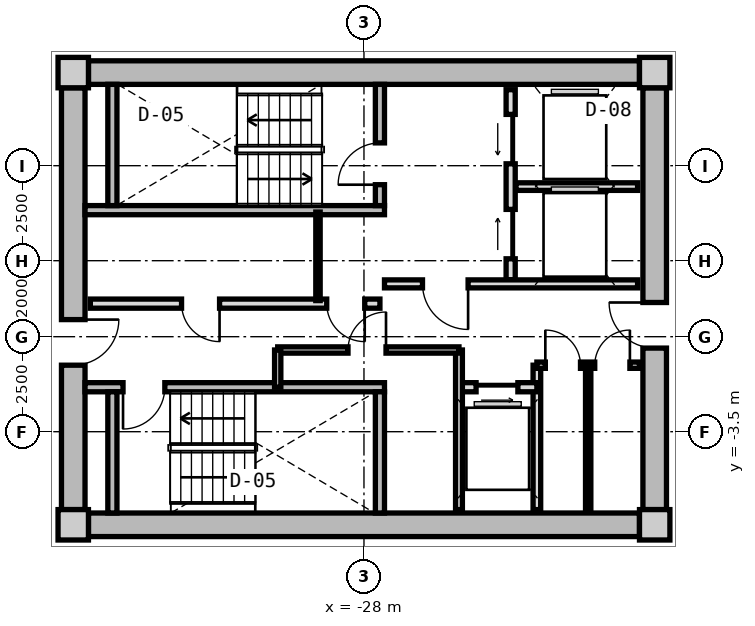
"""IFC4 building model, lengths in metres.
Left out: names, types, materials, properties, quantities, classifications, styles, units other than length and angle.
Written with IfcOpenShell. Run it as: python <this file> out.ifc"""

import sys

from ifc_helpers import new_model, si_unit, direction, frame, frame_2d, origin, origin_2d, place, context, subcontext, project, spatial, rectangle, extrude, source, transform, mapped, element, fill, save


model = new_model("IFC4")
c1 = context("Model", 3, precision=1e-05, world=origin(), true_north=direction((0.0, 1.0)))
c2 = subcontext(c1, "Body", "Model", "MODEL_VIEW")
j1 = project(units=[si_unit("LENGTHUNIT", "METRE"), si_unit("PLANEANGLEUNIT", "RADIAN")], contexts=[c1])
p1 = place(None, origin())
s1 = spatial("IfcSite", under=j1, at=p1, CompositionType="ELEMENT")
p2 = place(p1, origin())
s2 = spatial("IfcBuilding", under=s1, at=p2, CompositionType="ELEMENT")
p3 = place(p2, frame((0.0, 0.0, 183.1)))
s3 = spatial("IfcBuildingStorey", under=s2, at=p3, CompositionType="ELEMENT", Elevation=183.1)
m1 = source(origin(), c2, "Body", "SweptSolid", [
    extrude(rectangle(XDim=0.8, YDim=0.8, at=origin_2d()), origin(), (0.0, 0.0, 1.0), 3.05),
])
for number, where, z_axis, x_axis in (
    (1, (-35.65, -5.95, 0.0), (0.0, 0.0, 1.0), (1.0, 0.0, 0.0)),
    (2, (-20.35, -5.95, 0.0), (0.0, 0.0, 1.0), (1.0, 0.0, 0.0)),
    (3, (-20.35, 5.95, 0.0), (0.0, 0.0, 1.0), (1.0, 0.0, 0.0)),
    (4, (-35.65, 5.95, 0.0), (0.0, 0.0, 1.0), (1.0, 0.0, 0.0)),
):
    element("IfcColumn", number, at=place(p3, frame(where, z_axis=z_axis, x_axis=x_axis)), inside=s3, PredefinedType="COLUMN", context=c2, shape_type="MappedRepresentation", body=[
        mapped(m1, transform((0.0, 0.0, 0.0), x_axis=(1.0, 0.0, 0.0), y_axis=(0.0, 1.0, 0.0), z_axis=(0.0, 0.0, 1.0), scale=1.0)),
    ])
m2 = source(origin(), c2, "Body", "SweptSolid", [
    extrude(rectangle(XDim=14.5, YDim=0.62, at=frame_2d((7.25, 0.0))), origin(), (0.0, 0.0, 1.0), 2.73),
])
for number, where, z_axis, x_axis in (
    (5, (-35.25, 5.95, 0.0), (0.0, 0.0, 1.0), (1.0, 0.0, 0.0)),
    (6, (-20.75, -5.95, 0.0), (0.0, 0.0, 1.0), (-1.0, 0.0, 0.0)),
):
    element("IfcWall", number, at=place(p3, frame(where, z_axis=z_axis, x_axis=x_axis)), inside=s3, PredefinedType="SHEAR", context=c2, shape_type="MappedRepresentation", body=[
        mapped(m2, transform((0.0, 0.0, 0.0), x_axis=(1.0, 0.0, 0.0), y_axis=(0.0, 1.0, 0.0), z_axis=(0.0, 0.0, 1.0), scale=1.0)),
    ])
m3 = source(origin(), c2, "Body", "SweptSolid", [
    extrude(rectangle(XDim=11.1, YDim=0.62, at=frame_2d((5.55, 0.0))), origin(), (0.0, 0.0, 1.0), 2.73),
])
p4 = place(p3, frame((-35.65, -5.55, 0.0), z_axis=(0.0, 0.0, 1.0), x_axis=(0.0, 1.0, 0.0)))
e7 = element("IfcWall", 7, at=p4, inside=s3, PredefinedType="SHEAR", context=c2, shape_type="MappedRepresentation", body=[
    mapped(m3, transform((0.0, 0.0, 0.0), x_axis=(1.0, 0.0, 0.0), y_axis=(0.0, 1.0, 0.0), z_axis=(0.0, 0.0, 1.0), scale=1.0)),
])
p5 = place(p4, frame((3.8, 0.0, 0.0)))
e8 = element("IfcOpeningElement", 8, at=p5, cuts=e7, PredefinedType="OPENING", context=c2, shape_type="SweptSolid", body=[
    extrude(rectangle(XDim=1.2, YDim=2.15, at=frame_2d((0.6, 1.075))), frame((0.0, 0.32, 0.0), z_axis=(0.0, -1.0, 0.0), x_axis=(1.0, 0.0, 0.0)), (0.0, 0.0, 1.0), 0.64),
])
p6 = place(p3, frame((-20.35, 5.55, 0.0), z_axis=(0.0, 0.0, 1.0), x_axis=(0.0, -1.0, 0.0)))
e9 = element("IfcWall", 9, at=p6, inside=s3, PredefinedType="SHEAR", context=c2, shape_type="MappedRepresentation", body=[
    mapped(m3, transform((0.0, 0.0, 0.0), x_axis=(1.0, 0.0, 0.0), y_axis=(0.0, 1.0, 0.0), z_axis=(0.0, 0.0, 1.0), scale=1.0)),
])
p7 = place(p6, frame((5.65, 0.0, 0.0)))
e10 = element("IfcOpeningElement", 10, at=p7, cuts=e9, PredefinedType="OPENING", context=c2, shape_type="SweptSolid", body=[
    extrude(rectangle(XDim=1.2, YDim=2.15, at=frame_2d((0.6, 1.075))), frame((0.0, 0.32, 0.0), z_axis=(0.0, -1.0, 0.0), x_axis=(1.0, 0.0, 0.0)), (0.0, 0.0, 1.0), 0.64),
])
m4 = source(origin(), c2, "Body", "SweptSolid", [
    extrude(rectangle(XDim=7.88, YDim=0.24, at=frame_2d((3.94, 0.0))), origin(), (0.0, 0.0, 1.0), 2.73),
])
p8 = place(p3, frame((-35.34, 2.33, 0.0), z_axis=(0.0, 0.0, 1.0), x_axis=(1.0, 0.0, 0.0)))
e11 = element("IfcWall", 11, at=p8, inside=s3, PredefinedType="PARTITIONING", context=c2, shape_type="MappedRepresentation", body=[
    mapped(m4, transform((0.0, 0.0, 0.0), x_axis=(1.0, 0.0, 0.0), y_axis=(0.0, 1.0, 0.0), z_axis=(0.0, 0.0, 1.0), scale=1.0)),
])
m5 = source(origin(), c2, "Body", "SweptSolid", [
    extrude(rectangle(XDim=3.19, YDim=0.24, at=frame_2d((1.595, 0.0))), origin(), (0.0, 0.0, 1.0), 2.73),
])
p9 = place(p3, frame((-34.62, 2.45, 0.0), z_axis=(0.0, 0.0, 1.0), x_axis=(0.0, 1.0, 0.0)))
e12 = element("IfcWall", 12, at=p9, inside=s3, PredefinedType="PARTITIONING", context=c2, shape_type="MappedRepresentation", body=[
    mapped(m5, transform((0.0, 0.0, 0.0), x_axis=(1.0, 0.0, 0.0), y_axis=(0.0, 1.0, 0.0), z_axis=(0.0, 0.0, 1.0), scale=1.0)),
])
p10 = place(p3, frame((-27.58, 2.45, 0.0), z_axis=(0.0, 0.0, 1.0), x_axis=(0.0, 1.0, 0.0)))
e13 = element("IfcWall", 13, at=p10, inside=s3, PredefinedType="PARTITIONING", context=c2, shape_type="MappedRepresentation", body=[
    mapped(m5, transform((0.0, 0.0, 0.0), x_axis=(1.0, 0.0, 0.0), y_axis=(0.0, 1.0, 0.0), z_axis=(0.0, 0.0, 1.0), scale=1.0)),
])
p11 = place(p10, frame((0.55, 0.0, 0.0)))
e14 = element("IfcOpeningElement", 14, at=p11, cuts=e13, PredefinedType="OPENING", context=c2, shape_type="SweptSolid", body=[
    extrude(rectangle(XDim=1.1, YDim=2.15, at=frame_2d((0.55, 1.075))), frame((0.0, 0.13, 0.0), z_axis=(0.0, -1.0, 0.0), x_axis=(1.0, 0.0, 0.0)), (0.0, 0.0, 1.0), 0.26),
])
p12 = place(p3, frame((-35.34, -2.33, 0.0), z_axis=(0.0, 0.0, 1.0), x_axis=(1.0, 0.0, 0.0)))
e15 = element("IfcWall", 15, at=p12, inside=s3, PredefinedType="PARTITIONING", context=c2, shape_type="MappedRepresentation", body=[
    mapped(m4, transform((0.0, 0.0, 0.0), x_axis=(1.0, 0.0, 0.0), y_axis=(0.0, 1.0, 0.0), z_axis=(0.0, 0.0, 1.0), scale=1.0)),
])
p13 = place(p12, frame((1.0, 0.0, 0.0)))
e16 = element("IfcOpeningElement", 16, at=p13, cuts=e15, PredefinedType="OPENING", context=c2, shape_type="SweptSolid", body=[
    extrude(rectangle(XDim=1.1, YDim=2.15, at=frame_2d((0.55, 1.075))), frame((0.0, 0.13, 0.0), z_axis=(0.0, -1.0, 0.0), x_axis=(1.0, 0.0, 0.0)), (0.0, 0.0, 1.0), 0.26),
])
for number, where, z_axis, x_axis in (
    (17, (-34.62, -5.64, 0.0), (0.0, 0.0, 1.0), (0.0, 1.0, 0.0)),
    (18, (-27.58, -5.64, 0.0), (0.0, 0.0, 1.0), (0.0, 1.0, 0.0)),
):
    element("IfcWall", number, at=place(p3, frame(where, z_axis=z_axis, x_axis=x_axis)), inside=s3, PredefinedType="PARTITIONING", context=c2, shape_type="MappedRepresentation", body=[
        mapped(m5, transform((0.0, 0.0, 0.0), x_axis=(1.0, 0.0, 0.0), y_axis=(0.0, 1.0, 0.0), z_axis=(0.0, 0.0, 1.0), scale=1.0)),
    ])
m6 = source(origin(), c2, "Body", "SweptSolid", [
    extrude(rectangle(XDim=5.0, YDim=0.24, at=frame_2d((2.5, 0.0))), origin(), (0.0, 0.0, 1.0), 2.715),
])
p14 = place(p3, frame((-24.14, 0.5, 0.0), z_axis=(0.0, 0.0, 1.0), x_axis=(0.0, 1.0, 0.0)))
e19 = element("IfcWall", 19, at=p14, inside=s3, PredefinedType="PARTITIONING", context=c2, shape_type="MappedRepresentation", body=[
    mapped(m6, transform((0.0, 0.0, 0.0), x_axis=(1.0, 0.0, 0.0), y_axis=(0.0, 1.0, 0.0), z_axis=(0.0, 0.0, 1.0), scale=1.0)),
])
p15 = place(p14, frame((3.05, 0.0, 0.0)))
e20 = element("IfcOpeningElement", 20, at=p15, cuts=e19, PredefinedType="OPENING", context=c2, shape_type="SweptSolid", body=[
    extrude(rectangle(XDim=1.3, YDim=2.2, at=frame_2d((0.65, 1.1))), frame((0.0, 0.13, 0.0), z_axis=(0.0, -1.0, 0.0), x_axis=(1.0, 0.0, 0.0)), (0.0, 0.0, 1.0), 0.26),
])
p16 = place(p14, frame((0.55, 0.0, 0.0)))
e21 = element("IfcOpeningElement", 21, at=p16, cuts=e19, PredefinedType="OPENING", context=c2, shape_type="SweptSolid", body=[
    extrude(rectangle(XDim=1.3, YDim=2.2, at=frame_2d((0.65, 1.1))), frame((0.0, 0.13, 0.0), z_axis=(0.0, -1.0, 0.0), x_axis=(1.0, 0.0, 0.0)), (0.0, 0.0, 1.0), 0.26),
])
m7 = source(origin(), c2, "Body", "SweptSolid", [
    extrude(rectangle(XDim=3.2, YDim=0.2, at=frame_2d((1.6, 0.0))), origin(), (0.0, 0.0, 1.0), 2.715),
])
p17 = place(p3, frame((-24.0, 2.95, 0.0), z_axis=(0.0, 0.0, 1.0), x_axis=(1.0, 0.0, 0.0)))
e22 = element("IfcWall", 22, at=p17, inside=s3, PredefinedType="PARTITIONING", context=c2, shape_type="MappedRepresentation", body=[
    mapped(m7, transform((0.0, 0.0, 0.0), x_axis=(1.0, 0.0, 0.0), y_axis=(0.0, 1.0, 0.0), z_axis=(0.0, 0.0, 1.0), scale=1.0)),
])
m8 = source(origin(), c2, "Body", "SweptSolid", [
    extrude(rectangle(XDim=6.66, YDim=0.21, at=frame_2d((3.33, 0.0))), origin(), (0.0, 0.0, 1.0), 2.715),
])
p18 = place(p3, frame((-27.46, 0.39, 0.0), z_axis=(0.0, 0.0, 1.0), x_axis=(1.0, 0.0, 0.0)))
e23 = element("IfcWall", 23, at=p18, inside=s3, PredefinedType="PARTITIONING", context=c2, shape_type="MappedRepresentation", body=[
    mapped(m8, transform((0.0, 0.0, 0.0), x_axis=(1.0, 0.0, 0.0), y_axis=(0.0, 1.0, 0.0), z_axis=(0.0, 0.0, 1.0), scale=1.0)),
])
p19 = place(p18, frame((1.0, 0.0, 0.0)))
e24 = element("IfcOpeningElement", 24, at=p19, cuts=e23, PredefinedType="OPENING", context=c2, shape_type="SweptSolid", body=[
    extrude(rectangle(XDim=1.2, YDim=2.15, at=frame_2d((0.6, 1.075))), frame((0.0, 0.115, 0.0), z_axis=(0.0, -1.0, 0.0), x_axis=(1.0, 0.0, 0.0)), (0.0, 0.0, 1.0), 0.23),
])
m9 = source(origin(), c2, "Body", "SweptSolid", [
    extrude(rectangle(XDim=7.62, YDim=0.24, at=frame_2d((3.81, 0.0))), origin(), (0.0, 0.0, 1.0), 2.715),
])
p20 = place(p3, frame((-35.2, -0.13, 0.0), z_axis=(0.0, 0.0, 1.0), x_axis=(1.0, 0.0, 0.0)))
e25 = element("IfcWall", 25, at=p20, inside=s3, PredefinedType="PARTITIONING", context=c2, shape_type="MappedRepresentation", body=[
    mapped(m9, transform((0.0, 0.0, 0.0), x_axis=(1.0, 0.0, 0.0), y_axis=(0.0, 1.0, 0.0), z_axis=(0.0, 0.0, 1.0), scale=1.0)),
])
p21 = place(p20, frame((6.22, 0.0, 0.0)))
e26 = element("IfcOpeningElement", 26, at=p21, cuts=e25, PredefinedType="OPENING", context=c2, shape_type="SweptSolid", body=[
    extrude(rectangle(XDim=1.0, YDim=2.1, at=frame_2d((0.5, 1.05))), frame((0.0, 0.13, 0.0), z_axis=(0.0, -1.0, 0.0), x_axis=(1.0, 0.0, 0.0)), (0.0, 0.0, 1.0), 0.26),
])
p22 = place(p20, frame((2.4, 0.0, 0.0)))
e27 = element("IfcOpeningElement", 27, at=p22, cuts=e25, PredefinedType="OPENING", context=c2, shape_type="SweptSolid", body=[
    extrude(rectangle(XDim=1.0, YDim=2.1, at=frame_2d((0.5, 1.05))), frame((0.0, 0.13, 0.0), z_axis=(0.0, -1.0, 0.0), x_axis=(1.0, 0.0, 0.0)), (0.0, 0.0, 1.0), 0.26),
])
m10 = source(origin(), c2, "Body", "SweptSolid", [
    extrude(rectangle(XDim=2.33, YDim=0.115, at=frame_2d((1.165, 0.0))), origin(), (0.0, 0.0, 1.0), 2.715),
])
p23 = place(p3, frame((-29.21, -0.05, 0.0), z_axis=(0.0, 0.0, 1.0), x_axis=(0.0, 1.0, 0.0)))
e28 = element("IfcWall", 28, at=p23, inside=s3, PredefinedType="PARTITIONING", context=c2, shape_type="MappedRepresentation", body=[
    mapped(m10, transform((0.0, 0.0, 0.0), x_axis=(1.0, 0.0, 0.0), y_axis=(0.0, 1.0, 0.0), z_axis=(0.0, 0.0, 1.0), scale=1.0)),
])
m11 = source(origin(), c2, "Body", "SweptSolid", [
    extrude(rectangle(XDim=3.8, YDim=0.2, at=frame_2d((1.9, 0.0))), origin(), (0.0, 0.0, 1.0), 2.715),
])
p24 = place(p3, frame((-23.45, -5.55, 0.0), z_axis=(0.0, 0.0, 1.0), x_axis=(0.0, 1.0, 0.0)))
e29 = element("IfcWall", 29, at=p24, inside=s3, PredefinedType="PARTITIONING", context=c2, shape_type="MappedRepresentation", body=[
    mapped(m11, transform((0.0, 0.0, 0.0), x_axis=(1.0, 0.0, 0.0), y_axis=(0.0, 1.0, 0.0), z_axis=(0.0, 0.0, 1.0), scale=1.0)),
])
m12 = source(origin(), c2, "Body", "SweptSolid", [
    extrude(rectangle(XDim=2.05, YDim=0.24, at=frame_2d((1.025, 0.0))), origin(), (0.0, 0.0, 1.0), 2.715),
])
p25 = place(p3, frame((-25.5, -2.33, 0.0), z_axis=(0.0, 0.0, 1.0), x_axis=(1.0, 0.0, 0.0)))
e30 = element("IfcWall", 30, at=p25, inside=s3, PredefinedType="PARTITIONING", context=c2, shape_type="MappedRepresentation", body=[
    mapped(m12, transform((0.0, 0.0, 0.0), x_axis=(1.0, 0.0, 0.0), y_axis=(0.0, 1.0, 0.0), z_axis=(0.0, 0.0, 1.0), scale=1.0)),
])
p26 = place(p25, frame((0.45, 0.0, 0.0)))
e31 = element("IfcOpeningElement", 31, at=p26, cuts=e30, PredefinedType="OPENING", context=c2, shape_type="SweptSolid", body=[
    extrude(rectangle(XDim=1.1, YDim=2.2, at=frame_2d((0.55, 1.1))), frame((0.0, 0.13, 0.0), z_axis=(0.0, -1.0, 0.0), x_axis=(1.0, 0.0, 0.0)), (0.0, 0.0, 1.0), 0.26),
])
m13 = source(origin(), c2, "Body", "SweptSolid", [
    extrude(rectangle(XDim=4.2, YDim=0.18, at=frame_2d((2.1, 0.0))), origin(), (0.0, 0.0, 1.0), 2.715),
])
p27 = place(p3, frame((-25.5, -5.55, 0.0), z_axis=(0.0, 0.0, 1.0), x_axis=(0.0, 1.0, 0.0)))
e32 = element("IfcWall", 32, at=p27, inside=s3, PredefinedType="PARTITIONING", context=c2, shape_type="MappedRepresentation", body=[
    mapped(m13, transform((0.0, 0.0, 0.0), x_axis=(1.0, 0.0, 0.0), y_axis=(0.0, 1.0, 0.0), z_axis=(0.0, 0.0, 1.0), scale=1.0)),
])
m14 = source(origin(), c2, "Body", "SweptSolid", [
    extrude(rectangle(XDim=4.77, YDim=0.165, at=frame_2d((2.385, 0.0))), origin(), (0.0, 0.0, 1.0), 2.715),
])
p28 = place(p3, frame((-30.27, -1.35, 0.0), z_axis=(0.0, 0.0, 1.0), x_axis=(1.0, 0.0, 0.0)))
e33 = element("IfcWall", 33, at=p28, inside=s3, PredefinedType="PARTITIONING", context=c2, shape_type="MappedRepresentation", body=[
    mapped(m14, transform((0.0, 0.0, 0.0), x_axis=(1.0, 0.0, 0.0), y_axis=(0.0, 1.0, 0.0), z_axis=(0.0, 0.0, 1.0), scale=1.0)),
])
p29 = place(p28, frame((1.85, 0.0, 0.0)))
e34 = element("IfcOpeningElement", 34, at=p29, cuts=e33, PredefinedType="OPENING", context=c2, shape_type="SweptSolid", body=[
    extrude(rectangle(XDim=1.0, YDim=2.1, at=frame_2d((0.5, 1.05))), frame((0.0, 0.093, 0.0), z_axis=(0.0, -1.0, 0.0), x_axis=(1.0, 0.0, 0.0)), (0.0, 0.0, 1.0), 0.185),
])
m15 = source(origin(), c2, "Body", "SweptSolid", [
    extrude(rectangle(XDim=0.98, YDim=0.165, at=frame_2d((0.49, 0.0))), origin(), (0.0, 0.0, 1.0), 2.715),
])
p30 = place(p3, frame((-30.27, -2.33, 0.0), z_axis=(0.0, 0.0, 1.0), x_axis=(0.0, 1.0, 0.0)))
e35 = element("IfcWall", 35, at=p30, inside=s3, PredefinedType="PARTITIONING", context=c2, shape_type="MappedRepresentation", body=[
    mapped(m15, transform((0.0, 0.0, 0.0), x_axis=(1.0, 0.0, 0.0), y_axis=(0.0, 1.0, 0.0), z_axis=(0.0, 0.0, 1.0), scale=1.0)),
])
m16 = source(origin(), c2, "Body", "SweptSolid", [
    extrude(rectangle(XDim=2.7, YDim=0.165, at=frame_2d((1.35, 0.0))), origin(), (0.0, 0.0, 1.0), 2.715),
])
p31 = place(p3, frame((-23.45, -1.75, 0.0), z_axis=(0.0, 0.0, 1.0), x_axis=(1.0, 0.0, 0.0)))
e36 = element("IfcWall", 36, at=p31, inside=s3, PredefinedType="PARTITIONING", context=c2, shape_type="MappedRepresentation", body=[
    mapped(m16, transform((0.0, 0.0, 0.0), x_axis=(1.0, 0.0, 0.0), y_axis=(0.0, 1.0, 0.0), z_axis=(0.0, 0.0, 1.0), scale=1.0)),
])
p32 = place(p31, frame((0.222, 0.0, 0.0)))
e37 = element("IfcOpeningElement", 37, at=p32, cuts=e36, PredefinedType="OPENING", context=c2, shape_type="SweptSolid", body=[
    extrude(rectangle(XDim=0.925, YDim=2.1, at=frame_2d((0.462, 1.05))), frame((0.0, 0.093, 0.0), z_axis=(0.0, -1.0, 0.0), x_axis=(1.0, 0.0, 0.0)), (0.0, 0.0, 1.0), 0.185),
])
p33 = place(p31, frame((1.522, 0.0, 0.0)))
e38 = element("IfcOpeningElement", 38, at=p33, cuts=e36, PredefinedType="OPENING", context=c2, shape_type="SweptSolid", body=[
    extrude(rectangle(XDim=0.925, YDim=2.1, at=frame_2d((0.462, 1.05))), frame((0.0, 0.093, 0.0), z_axis=(0.0, -1.0, 0.0), x_axis=(1.0, 0.0, 0.0)), (0.0, 0.0, 1.0), 0.185),
])
m17 = source(origin(), c2, "Body", "SweptSolid", [
    extrude(rectangle(XDim=3.8, YDim=0.14, at=frame_2d((1.9, 0.0))), origin(), (0.0, 0.0, 1.0), 2.715),
])
p34 = place(p3, frame((-22.1, -5.55, 0.0), z_axis=(0.0, 0.0, 1.0), x_axis=(0.0, 1.0, 0.0)))
e39 = element("IfcWall", 39, at=p34, inside=s3, PredefinedType="PARTITIONING", context=c2, shape_type="MappedRepresentation", body=[
    mapped(m17, transform((0.0, 0.0, 0.0), x_axis=(1.0, 0.0, 0.0), y_axis=(0.0, 1.0, 0.0), z_axis=(0.0, 0.0, 1.0), scale=1.0)),
])
m18 = source(origin(), c2, "Body", "SweptSolid", [
    extrude(rectangle(XDim=1.1, YDim=2.15, at=frame_2d((0.55, 1.075))), frame((0.0, 0.025, 0.0), z_axis=(0.0, -1.0, 0.0), x_axis=(1.0, 0.0, 0.0)), (0.0, 0.0, 1.0), 0.05),
])
p35 = place(p11, origin())
e40 = element("IfcDoor", 40, at=p35, inside=s3, OperationType="SINGLE_SWING_LEFT", PredefinedType="DOOR", context=c2, shape_type="MappedRepresentation", body=[
    mapped(m18, transform((0.0, 0.0, 0.0), x_axis=(1.0, 0.0, 0.0), y_axis=(0.0, 1.0, 0.0), z_axis=(0.0, 0.0, 1.0), scale=1.0)),
])
fill(e14, e40)
p36 = place(p13, frame((1.1, 0.0, 0.0), z_axis=(0.0, 0.0, 1.0), x_axis=(-1.0, 0.0, 0.0)))
e41 = element("IfcDoor", 41, at=p36, inside=s3, OperationType="SINGLE_SWING_RIGHT", PredefinedType="DOOR", context=c2, shape_type="MappedRepresentation", body=[
    mapped(m18, transform((0.0, 0.0, 0.0), x_axis=(1.0, 0.0, 0.0), y_axis=(0.0, 1.0, 0.0), z_axis=(0.0, 0.0, 1.0), scale=1.0)),
])
fill(e16, e41)
m19 = source(origin(), c2, "Body", "SweptSolid", [
    extrude(rectangle(XDim=1.3, YDim=2.2, at=frame_2d((0.65, 1.1))), frame((0.0, 0.025, 0.0), z_axis=(0.0, -1.0, 0.0), x_axis=(1.0, 0.0, 0.0)), (0.0, 0.0, 1.0), 0.05),
])
p37 = place(p15, origin())
e42 = element("IfcDoor", 42, at=p37, inside=s3, OperationType="SLIDING_TO_LEFT", PredefinedType="DOOR", context=c2, shape_type="MappedRepresentation", body=[
    mapped(m19, transform((0.0, 0.0, 0.0), x_axis=(1.0, 0.0, 0.0), y_axis=(0.0, 1.0, 0.0), z_axis=(0.0, 0.0, 1.0), scale=1.0)),
])
fill(e20, e42)
p38 = place(p16, origin())
e43 = element("IfcDoor", 43, at=p38, inside=s3, OperationType="SLIDING_TO_RIGHT", PredefinedType="DOOR", context=c2, shape_type="MappedRepresentation", body=[
    mapped(m19, transform((0.0, 0.0, 0.0), x_axis=(1.0, 0.0, 0.0), y_axis=(0.0, 1.0, 0.0), z_axis=(0.0, 0.0, 1.0), scale=1.0)),
])
fill(e21, e43)
m20 = source(origin(), c2, "Body", "SweptSolid", [
    extrude(rectangle(XDim=1.2, YDim=2.15, at=frame_2d((0.6, 1.075))), frame((0.0, 0.025, 0.0), z_axis=(0.0, -1.0, 0.0), x_axis=(1.0, 0.0, 0.0)), (0.0, 0.0, 1.0), 0.05),
])
p39 = place(p19, frame((1.2, 0.0, 0.0), z_axis=(0.0, 0.0, 1.0), x_axis=(-1.0, 0.0, 0.0)))
e44 = element("IfcDoor", 44, at=p39, inside=s3, OperationType="SINGLE_SWING_LEFT", PredefinedType="DOOR", context=c2, shape_type="MappedRepresentation", body=[
    mapped(m20, transform((0.0, 0.0, 0.0), x_axis=(1.0, 0.0, 0.0), y_axis=(0.0, 1.0, 0.0), z_axis=(0.0, 0.0, 1.0), scale=1.0)),
])
fill(e24, e44)
p40 = place(p5, frame((1.2, 0.0, 0.0), z_axis=(0.0, 0.0, 1.0), x_axis=(-1.0, 0.0, 0.0)))
e45 = element("IfcDoor", 45, at=p40, inside=s3, OperationType="SINGLE_SWING_LEFT", PredefinedType="DOOR", context=c2, shape_type="MappedRepresentation", body=[
    mapped(m20, transform((0.0, 0.0, 0.0), x_axis=(1.0, 0.0, 0.0), y_axis=(0.0, 1.0, 0.0), z_axis=(0.0, 0.0, 1.0), scale=1.0)),
])
fill(e8, e45)
p41 = place(p7, frame((1.2, 0.0, 0.0), z_axis=(0.0, 0.0, 1.0), x_axis=(-1.0, 0.0, 0.0)))
e46 = element("IfcDoor", 46, at=p41, inside=s3, OperationType="SINGLE_SWING_RIGHT", PredefinedType="DOOR", context=c2, shape_type="MappedRepresentation", body=[
    mapped(m20, transform((0.0, 0.0, 0.0), x_axis=(1.0, 0.0, 0.0), y_axis=(0.0, 1.0, 0.0), z_axis=(0.0, 0.0, 1.0), scale=1.0)),
])
fill(e10, e46)
m21 = source(origin(), c2, "Body", "SweptSolid", [
    extrude(rectangle(XDim=1.0, YDim=2.1, at=frame_2d((0.5, 1.05))), frame((0.0, 0.025, 0.0), z_axis=(0.0, -1.0, 0.0), x_axis=(1.0, 0.0, 0.0)), (0.0, 0.0, 1.0), 0.05),
])
p42 = place(p21, frame((1.0, 0.0, 0.0), z_axis=(0.0, 0.0, 1.0), x_axis=(-1.0, 0.0, 0.0)))
e47 = element("IfcDoor", 47, at=p42, inside=s3, OperationType="SINGLE_SWING_LEFT", PredefinedType="DOOR", context=c2, shape_type="MappedRepresentation", body=[
    mapped(m21, transform((0.0, 0.0, 0.0), x_axis=(1.0, 0.0, 0.0), y_axis=(0.0, 1.0, 0.0), z_axis=(0.0, 0.0, 1.0), scale=1.0)),
])
fill(e26, e47)
p43 = place(p22, frame((1.0, 0.0, 0.0), z_axis=(0.0, 0.0, 1.0), x_axis=(-1.0, 0.0, 0.0)))
e48 = element("IfcDoor", 48, at=p43, inside=s3, OperationType="SINGLE_SWING_LEFT", PredefinedType="DOOR", context=c2, shape_type="MappedRepresentation", body=[
    mapped(m21, transform((0.0, 0.0, 0.0), x_axis=(1.0, 0.0, 0.0), y_axis=(0.0, 1.0, 0.0), z_axis=(0.0, 0.0, 1.0), scale=1.0)),
])
fill(e27, e48)
m22 = source(origin(), c2, "Body", "SweptSolid", [
    extrude(rectangle(XDim=1.1, YDim=2.2, at=frame_2d((0.55, 1.1))), frame((0.0, 0.025, 0.0), z_axis=(0.0, -1.0, 0.0), x_axis=(1.0, 0.0, 0.0)), (0.0, 0.0, 1.0), 0.05),
])
p44 = place(p26, frame((1.1, 0.0, 0.0), z_axis=(0.0, 0.0, 1.0), x_axis=(-1.0, 0.0, 0.0)))
e49 = element("IfcDoor", 49, at=p44, inside=s3, OperationType="SLIDING_TO_RIGHT", PredefinedType="DOOR", context=c2, shape_type="MappedRepresentation", body=[
    mapped(m22, transform((0.0, 0.0, 0.0), x_axis=(1.0, 0.0, 0.0), y_axis=(0.0, 1.0, 0.0), z_axis=(0.0, 0.0, 1.0), scale=1.0)),
])
fill(e31, e49)
p45 = place(p29, origin())
e50 = element("IfcDoor", 50, at=p45, inside=s3, OperationType="SINGLE_SWING_RIGHT", PredefinedType="DOOR", context=c2, shape_type="MappedRepresentation", body=[
    mapped(m21, transform((0.0, 0.0, 0.0), x_axis=(1.0, 0.0, 0.0), y_axis=(0.0, 1.0, 0.0), z_axis=(0.0, 0.0, 1.0), scale=1.0)),
])
fill(e34, e50)
m23 = source(origin(), c2, "Body", "SweptSolid", [
    extrude(rectangle(XDim=0.925, YDim=2.1, at=frame_2d((0.462, 1.05))), frame((0.0, 0.025, 0.0), z_axis=(0.0, -1.0, 0.0), x_axis=(1.0, 0.0, 0.0)), (0.0, 0.0, 1.0), 0.05),
])
p46 = place(p32, origin())
e51 = element("IfcDoor", 51, at=p46, inside=s3, OperationType="SINGLE_SWING_LEFT", PredefinedType="DOOR", context=c2, shape_type="MappedRepresentation", body=[
    mapped(m23, transform((0.0, 0.0, 0.0), x_axis=(1.0, 0.0, 0.0), y_axis=(0.0, 1.0, 0.0), z_axis=(0.0, 0.0, 1.0), scale=1.0)),
])
fill(e37, e51)
p47 = place(p33, origin())
e52 = element("IfcDoor", 52, at=p47, inside=s3, OperationType="SINGLE_SWING_RIGHT", PredefinedType="DOOR", context=c2, shape_type="MappedRepresentation", body=[
    mapped(m23, transform((0.0, 0.0, 0.0), x_axis=(1.0, 0.0, 0.0), y_axis=(0.0, 1.0, 0.0), z_axis=(0.0, 0.0, 1.0), scale=1.0)),
])
fill(e38, e52)
save(model, sys.argv[1])
